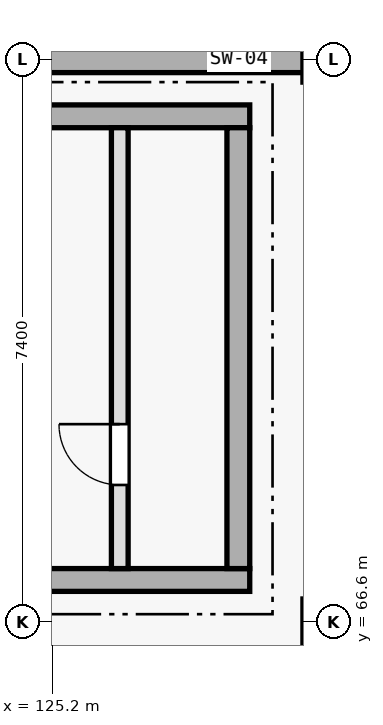
"""IFC4 building model, lengths in metres.
Left out: names, types, materials, properties, quantities, classifications, styles, units other than length and angle.
Written with IfcOpenShell. Run it as: python <this file> out.ifc"""

import sys

from ifc_helpers import new_model, si_unit, direction, frame, frame_2d, origin, place, context, subcontext, project, spatial, rectangle, extrude, element, fill, save


model = new_model("IFC4")
c1 = context("Model", 3, precision=1e-05, world=origin(), true_north=direction((0.0, 1.0)))
c2 = subcontext(c1, "Body", "Model", "MODEL_VIEW")
j1 = project(units=[si_unit("LENGTHUNIT", "METRE"), si_unit("PLANEANGLEUNIT", "RADIAN")], contexts=[c1])
p1 = place(None, origin())
s1 = spatial("IfcSite", under=j1, at=p1, CompositionType="ELEMENT")
p2 = place(p1, origin())
s2 = spatial("IfcBuilding", under=s1, at=p2, CompositionType="ELEMENT")
p3 = place(p2, frame((0.0, 0.0, -4.8)))
s3 = spatial("IfcBuildingStorey", under=s2, at=p3, CompositionType="ELEMENT", Elevation=-4.8)
p4 = place(p3, frame((113.4, 67.15, 0.0), z_axis=(0.0, 0.0, 1.0), x_axis=(1.0, 0.0, 0.0)))
e1 = element("IfcWall", 1, at=p4, inside=s3, PredefinedType="SHEAR", context=c2, shape_type="SweptSolid", body=[
    extrude(rectangle(XDim=14.4, YDim=0.3, at=frame_2d((7.2, 0.0))), origin(), (0.0, 0.0, 1.0), 4.795),
])
p5 = place(p4, frame((9.95, 0.0, 0.0)))
e2 = element("IfcOpeningElement", 2, at=p5, cuts=e1, PredefinedType="OPENING", context=c2, shape_type="SweptSolid", body=[
    extrude(rectangle(XDim=1.3, YDim=2.2, at=frame_2d((0.65, 1.1))), frame((0.0, 0.16, 0.0), z_axis=(0.0, -1.0, 0.0), x_axis=(1.0, 0.0, 0.0)), (0.0, 0.0, 1.0), 0.32),
])
p6 = place(p3, frame((113.4, 73.25, 0.0), z_axis=(0.0, 0.0, 1.0), x_axis=(1.0, 0.0, 0.0)))
e3 = element("IfcWall", 3, at=p6, inside=s3, PredefinedType="SHEAR", context=c2, shape_type="SweptSolid", body=[
    extrude(rectangle(XDim=14.4, YDim=0.3, at=frame_2d((7.2, 0.0))), origin(), (0.0, 0.0, 1.0), 4.795),
])
p7 = place(p3, frame((127.65, 67.3, 0.0), z_axis=(0.0, 0.0, 1.0), x_axis=(0.0, 1.0, 0.0)))
e4 = element("IfcWall", 4, at=p7, inside=s3, PredefinedType="SHEAR", context=c2, shape_type="SweptSolid", body=[
    extrude(rectangle(XDim=5.8, YDim=0.3, at=frame_2d((2.9, 0.0))), origin(), (0.0, 0.0, 1.0), 4.795),
])
p8 = place(p3, frame((126.09, 67.3, 0.0), z_axis=(0.0, 0.0, 1.0), x_axis=(0.0, 1.0, 0.0)))
e5 = element("IfcWall", 5, at=p8, inside=s3, PredefinedType="PLUMBINGWALL", context=c2, shape_type="SweptSolid", body=[
    extrude(rectangle(XDim=5.8, YDim=0.22, at=frame_2d((2.9, 0.0))), origin(), (0.0, 0.0, 1.0), 4.38),
])
p9 = place(p8, frame((1.1, 0.0, 0.0)))
e6 = element("IfcOpeningElement", 6, at=p9, cuts=e5, PredefinedType="OPENING", context=c2, shape_type="SweptSolid", body=[
    extrude(rectangle(XDim=0.8, YDim=2.1, at=frame_2d((0.4, 1.05))), frame((0.0, 0.12, 0.0), z_axis=(0.0, -1.0, 0.0), x_axis=(1.0, 0.0, 0.0)), (0.0, 0.0, 1.0), 0.24),
])
p10 = place(p3, frame((113.225, 74.0, 0.0), z_axis=(0.0, 0.0, 1.0), x_axis=(1.0, 0.0, 0.0)))
e7 = element("IfcWall", 7, at=p10, inside=s3, PredefinedType="SOLIDWALL", context=c2, shape_type="SweptSolid", body=[
    extrude(rectangle(XDim=28.865, YDim=0.35, at=frame_2d((14.433, 0.0))), origin(), (0.0, 0.0, 1.0), 3.63),
])
p11 = place(p9, origin())
e8 = element("IfcDoor", 8, at=p11, inside=s3, OperationType="SINGLE_SWING_RIGHT", PredefinedType="DOOR", context=c2, shape_type="SweptSolid", body=[
    extrude(rectangle(XDim=0.8, YDim=2.1, at=frame_2d((0.4, 1.05))), frame((0.0, 0.025, 0.0), z_axis=(0.0, -1.0, 0.0), x_axis=(1.0, 0.0, 0.0)), (0.0, 0.0, 1.0), 0.05),
])
fill(e6, e8)
save(model, sys.argv[1])
